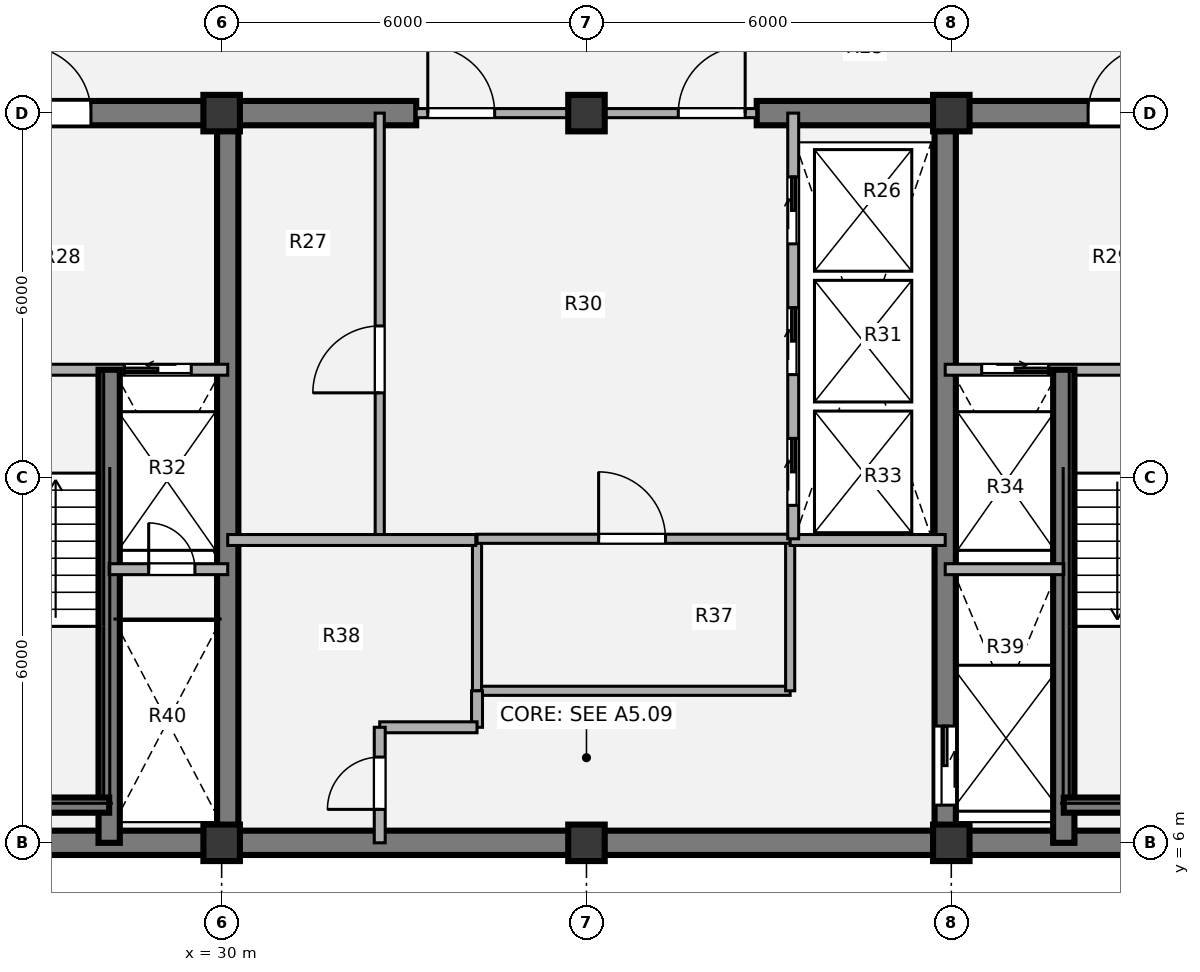
"""IFC4 building model, lengths in metres.
Left out: names, types, materials, properties, quantities, classifications, styles, units other than length and angle.
Written with IfcOpenShell. Run it as: python <this file> out.ifc"""

import sys

from ifc_helpers import new_model, si_unit, direction, frame, frame_2d, origin, origin_2d, place, context, subcontext, project, spatial, rectangle, extrude, source, transform, mapped, element, fill, save


model = new_model("IFC4")
c1 = context("Model", 3, precision=1e-05, world=origin(), true_north=direction((0.0, 1.0)))
c2 = subcontext(c1, "Body", "Model", "MODEL_VIEW")
j1 = project(units=[si_unit("LENGTHUNIT", "METRE"), si_unit("PLANEANGLEUNIT", "RADIAN")], contexts=[c1])
p1 = place(None, origin())
s1 = spatial("IfcSite", under=j1, at=p1, CompositionType="ELEMENT")
p2 = place(p1, origin())
s2 = spatial("IfcBuilding", under=s1, at=p2, CompositionType="ELEMENT")
p3 = place(p2, frame((0.0, 0.0, 226.8)))
s3 = spatial("IfcBuildingStorey", under=s2, at=p3, CompositionType="ELEMENT", Elevation=226.8)
m1 = source(origin(), c2, "Body", "SweptSolid", [
    extrude(rectangle(XDim=0.6, YDim=0.6, at=origin_2d()), origin(), (0.0, 0.0, 1.0), 3.78),
])
for number, where, z_axis, x_axis in (
    (1, (30.0, 6.0, 0.0), (0.0, 0.0, 1.0), (1.0, 0.0, 0.0)),
    (2, (36.0, 6.0, 0.0), (0.0, 0.0, 1.0), (1.0, 0.0, 0.0)),
    (3, (42.0, 6.0, 0.0), (0.0, 0.0, 1.0), (1.0, 0.0, 0.0)),
    (4, (30.0, 18.0, 0.0), (0.0, 0.0, 1.0), (1.0, 0.0, 0.0)),
    (5, (36.0, 18.0, 0.0), (0.0, 0.0, 1.0), (1.0, 0.0, 0.0)),
    (6, (42.0, 18.0, 0.0), (0.0, 0.0, 1.0), (1.0, 0.0, 0.0)),
):
    element("IfcColumn", number, at=place(p3, frame(where, z_axis=z_axis, x_axis=x_axis)), inside=s3, PredefinedType="COLUMN", context=c2, shape_type="MappedRepresentation", body=[
        mapped(m1, transform((0.0, 0.0, 0.0), x_axis=(1.0, 0.0, 0.0), y_axis=(0.0, 1.0, 0.0), z_axis=(0.0, 0.0, 1.0), scale=1.0)),
    ])
p4 = place(p3, frame((48.2, 6.0, 0.0), z_axis=(0.0, 0.0, 1.0), x_axis=(-1.0, 0.0, 0.0)))
e7 = element("IfcWall", 7, at=p4, inside=s3, PredefinedType="SHEAR", context=c2, shape_type="SweptSolid", body=[
    extrude(rectangle(XDim=24.4, YDim=0.4, at=frame_2d((12.2, 0.0))), origin(), (0.0, 0.0, 1.0), 3.78),
])
p5 = place(p3, frame((23.8, 18.0, 0.0), z_axis=(0.0, 0.0, 1.0), x_axis=(1.0, 0.0, 0.0)))
e8 = element("IfcWall", 8, at=p5, inside=s3, PredefinedType="SHEAR", context=c2, shape_type="SweptSolid", body=[
    extrude(rectangle(XDim=9.4, YDim=0.4, at=frame_2d((4.7, 0.0))), origin(), (0.0, 0.0, 1.0), 3.78),
])
p6 = place(p5, frame((2.95, 0.0, 0.0)))
e9 = element("IfcOpeningElement", 9, at=p6, cuts=e8, PredefinedType="OPENING", context=c2, shape_type="SweptSolid", body=[
    extrude(rectangle(XDim=1.1, YDim=2.1, at=origin_2d()), frame((0.55, 0.21, 1.05), z_axis=(0.0, -1.0, 0.0), x_axis=(1.0, 0.0, 0.0)), (0.0, 0.0, 1.0), 0.42),
])
p7 = place(p3, frame((38.8, 18.0, 0.0), z_axis=(0.0, 0.0, 1.0), x_axis=(1.0, 0.0, 0.0)))
e10 = element("IfcWall", 10, at=p7, inside=s3, PredefinedType="SHEAR", context=c2, shape_type="SweptSolid", body=[
    extrude(rectangle(XDim=9.4, YDim=0.4, at=frame_2d((4.7, 0.0))), origin(), (0.0, 0.0, 1.0), 3.78),
])
p8 = place(p7, frame((5.45, 0.0, 0.0)))
e11 = element("IfcOpeningElement", 11, at=p8, cuts=e10, PredefinedType="OPENING", context=c2, shape_type="SweptSolid", body=[
    extrude(rectangle(XDim=1.1, YDim=2.1, at=origin_2d()), frame((0.55, 0.21, 1.05), z_axis=(0.0, -1.0, 0.0), x_axis=(1.0, 0.0, 0.0)), (0.0, 0.0, 1.0), 0.42),
])
p9 = place(p3, frame((30.1, 6.0, 0.0), z_axis=(0.0, 0.0, 1.0), x_axis=(0.0, 1.0, 0.0)))
e12 = element("IfcWall", 12, at=p9, inside=s3, PredefinedType="SHEAR", context=c2, shape_type="SweptSolid", body=[
    extrude(rectangle(XDim=12.0, YDim=0.35, at=frame_2d((6.0, 0.0))), origin(), (0.0, 0.0, 1.0), 3.78),
])
p10 = place(p3, frame((41.9, 18.0, 0.0), z_axis=(0.0, 0.0, 1.0), x_axis=(0.0, -1.0, 0.0)))
e13 = element("IfcWall", 13, at=p10, inside=s3, PredefinedType="SHEAR", context=c2, shape_type="SweptSolid", body=[
    extrude(rectangle(XDim=12.0, YDim=0.35, at=frame_2d((6.0, 0.0))), origin(), (0.0, 0.0, 1.0), 3.78),
])
p11 = place(p10, frame((10.08, 0.0, 0.0)))
e14 = element("IfcOpeningElement", 14, at=p11, cuts=e13, PredefinedType="OPENING", context=c2, shape_type="SweptSolid", body=[
    extrude(rectangle(XDim=1.3, YDim=2.1, at=origin_2d()), frame((0.65, 0.185, 1.05), z_axis=(0.0, -1.0, 0.0), x_axis=(1.0, 0.0, 0.0)), (0.0, 0.0, 1.0), 0.37),
])
p12 = place(p3, frame((32.6, 11.0, 0.0), z_axis=(0.0, 0.0, 1.0), x_axis=(0.0, 1.0, 0.0)))
e15 = element("IfcWall", 15, at=p12, inside=s3, PredefinedType="PARTITIONING", context=c2, shape_type="SweptSolid", body=[
    extrude(rectangle(XDim=7.0, YDim=0.15, at=frame_2d((3.5, 0.0))), origin(), (0.0, 0.0, 1.0), 3.5),
])
p13 = place(p12, frame((2.4, 0.0, 0.0)))
e16 = element("IfcOpeningElement", 16, at=p13, cuts=e15, PredefinedType="OPENING", context=c2, shape_type="SweptSolid", body=[
    extrude(rectangle(XDim=1.1, YDim=2.1, at=origin_2d()), frame((0.55, 0.085, 1.05), z_axis=(0.0, -1.0, 0.0), x_axis=(1.0, 0.0, 0.0)), (0.0, 0.0, 1.0), 0.17),
])
p14 = place(p3, frame((34.2, 8.5, 0.0), z_axis=(0.0, 0.0, 1.0), x_axis=(1.0, 0.0, 0.0)))
e17 = element("IfcWall", 17, at=p14, inside=s3, PredefinedType="PARTITIONING", context=c2, shape_type="SweptSolid", body=[
    extrude(rectangle(XDim=5.15, YDim=0.15, at=frame_2d((2.575, 0.0))), origin(), (0.0, 0.0, 1.0), 3.5),
])
for number, where, z_axis, x_axis in (
    (18, (34.2, 8.5, 0.0), (0.0, 0.0, 1.0), (0.0, 1.0, 0.0)),
    (19, (39.35, 8.5, 0.0), (0.0, 0.0, 1.0), (0.0, 1.0, 0.0)),
):
    element("IfcWall", number, at=place(p3, frame(where, z_axis=z_axis, x_axis=x_axis)), inside=s3, PredefinedType="PARTITIONING", context=c2, shape_type="SweptSolid", body=[
        extrude(rectangle(XDim=2.5, YDim=0.15, at=frame_2d((1.25, 0.0))), origin(), (0.0, 0.0, 1.0), 3.5),
    ])
p15 = place(p3, frame((34.2, 11.0, 0.0), z_axis=(0.0, 0.0, 1.0), x_axis=(1.0, 0.0, 0.0)))
e20 = element("IfcWall", 20, at=p15, inside=s3, PredefinedType="PARTITIONING", context=c2, shape_type="SweptSolid", body=[
    extrude(rectangle(XDim=5.15, YDim=0.15, at=frame_2d((2.575, 0.0))), origin(), (0.0, 0.0, 1.0), 3.5),
])
p16 = place(p15, frame((2.0, 0.0, 0.0)))
e21 = element("IfcOpeningElement", 21, at=p16, cuts=e20, PredefinedType="OPENING", context=c2, shape_type="SweptSolid", body=[
    extrude(rectangle(XDim=1.1, YDim=2.1, at=origin_2d()), frame((0.55, 0.085, 1.05), z_axis=(0.0, -1.0, 0.0), x_axis=(1.0, 0.0, 0.0)), (0.0, 0.0, 1.0), 0.17),
])
p17 = place(p3, frame((30.1, 10.98, 0.0), z_axis=(0.0, 0.0, 1.0), x_axis=(1.0, 0.0, 0.0)))
e22 = element("IfcWall", 22, at=p17, inside=s3, PredefinedType="PARTITIONING", context=c2, shape_type="SweptSolid", body=[
    extrude(rectangle(XDim=4.08, YDim=0.18, at=frame_2d((2.04, 0.0))), origin(), (0.0, 0.0, 1.0), 3.5),
])
p18 = place(p3, frame((34.2, 7.9, 0.0), z_axis=(0.0, 0.0, 1.0), x_axis=(0.0, 1.0, 0.0)))
e23 = element("IfcWall", 23, at=p18, inside=s3, PredefinedType="PARTITIONING", context=c2, shape_type="SweptSolid", body=[
    extrude(rectangle(XDim=0.6, YDim=0.18, at=frame_2d((0.3, 0.0))), origin(), (0.0, 0.0, 1.0), 3.5),
])
p19 = place(p3, frame((32.6, 7.9, 0.0), z_axis=(0.0, 0.0, 1.0), x_axis=(1.0, 0.0, 0.0)))
e24 = element("IfcWall", 24, at=p19, inside=s3, PredefinedType="PARTITIONING", context=c2, shape_type="SweptSolid", body=[
    extrude(rectangle(XDim=1.6, YDim=0.18, at=frame_2d((0.8, 0.0))), origin(), (0.0, 0.0, 1.0), 3.5),
])
p20 = place(p3, frame((32.6, 6.0, 0.0), z_axis=(0.0, 0.0, 1.0), x_axis=(0.0, 1.0, 0.0)))
e25 = element("IfcWall", 25, at=p20, inside=s3, PredefinedType="PARTITIONING", context=c2, shape_type="SweptSolid", body=[
    extrude(rectangle(XDim=1.9, YDim=0.18, at=frame_2d((0.95, 0.0))), origin(), (0.0, 0.0, 1.0), 3.5),
])
p21 = place(p20, frame((0.55, 0.0, 0.0)))
e26 = element("IfcOpeningElement", 26, at=p21, cuts=e25, PredefinedType="OPENING", context=c2, shape_type="SweptSolid", body=[
    extrude(rectangle(XDim=0.86, YDim=2.1, at=origin_2d()), frame((0.43, 0.1, 1.05), z_axis=(0.0, -1.0, 0.0), x_axis=(1.0, 0.0, 0.0)), (0.0, 0.0, 1.0), 0.2),
])
p22 = place(p3, frame((39.35, 10.98, 0.0), z_axis=(0.0, 0.0, 1.0), x_axis=(1.0, 0.0, 0.0)))
e27 = element("IfcWall", 27, at=p22, inside=s3, PredefinedType="PARTITIONING", context=c2, shape_type="SweptSolid", body=[
    extrude(rectangle(XDim=2.55, YDim=0.18, at=frame_2d((1.275, 0.0))), origin(), (0.0, 0.0, 1.0), 3.5),
])
p23 = place(p3, frame((33.2, 18.0, 0.0), z_axis=(0.0, 0.0, 1.0), x_axis=(1.0, 0.0, 0.0)))
e28 = element("IfcWall", 28, at=p23, inside=s3, PredefinedType="PARTITIONING", context=c2, shape_type="SweptSolid", body=[
    extrude(rectangle(XDim=5.6, YDim=0.15, at=frame_2d((2.8, 0.0))), origin(), (0.0, 0.0, 1.0), 2.515),
])
p24 = place(p23, frame((0.19, 0.0, 0.0)))
e29 = element("IfcOpeningElement", 29, at=p24, cuts=e28, PredefinedType="OPENING", context=c2, shape_type="SweptSolid", body=[
    extrude(rectangle(XDim=1.1, YDim=2.1, at=origin_2d()), frame((0.55, 0.085, 1.05), z_axis=(0.0, -1.0, 0.0), x_axis=(1.0, 0.0, 0.0)), (0.0, 0.0, 1.0), 0.17),
])
p25 = place(p23, frame((4.31, 0.0, 0.0)))
e30 = element("IfcOpeningElement", 30, at=p25, cuts=e28, PredefinedType="OPENING", context=c2, shape_type="SweptSolid", body=[
    extrude(rectangle(XDim=1.1, YDim=2.1, at=origin_2d()), frame((0.55, 0.085, 1.05), z_axis=(0.0, -1.0, 0.0), x_axis=(1.0, 0.0, 0.0)), (0.0, 0.0, 1.0), 0.17),
])
p26 = place(p3, frame((24.0, 13.78, 0.0), z_axis=(0.0, 0.0, 1.0), x_axis=(1.0, 0.0, 0.0)))
e31 = element("IfcWall", 31, at=p26, inside=s3, PredefinedType="PARTITIONING", context=c2, shape_type="SweptSolid", body=[
    extrude(rectangle(XDim=6.1, YDim=0.18, at=frame_2d((3.05, 0.0))), origin(), (0.0, 0.0, 1.0), 3.5),
])
p27 = place(p26, frame((1.15, 0.0, 0.0)))
e32 = element("IfcOpeningElement", 32, at=p27, cuts=e31, PredefinedType="OPENING", context=c2, shape_type="SweptSolid", body=[
    extrude(rectangle(XDim=1.1, YDim=2.1, at=origin_2d()), frame((0.55, 0.1, 1.05), z_axis=(0.0, -1.0, 0.0), x_axis=(1.0, 0.0, 0.0)), (0.0, 0.0, 1.0), 0.2),
])
p28 = place(p26, frame((4.4, 0.0, 0.0)))
e33 = element("IfcOpeningElement", 33, at=p28, cuts=e31, PredefinedType="OPENING", context=c2, shape_type="SweptSolid", body=[
    extrude(rectangle(XDim=1.1, YDim=2.1, at=origin_2d()), frame((0.55, 0.1, 1.05), z_axis=(0.0, -1.0, 0.0), x_axis=(1.0, 0.0, 0.0)), (0.0, 0.0, 1.0), 0.2),
])
p29 = place(p3, frame((28.15, 6.0, 0.0), z_axis=(0.0, 0.0, 1.0), x_axis=(0.0, 1.0, 0.0)))
e34 = element("IfcWall", 34, at=p29, inside=s3, PredefinedType="SHEAR", context=c2, shape_type="SweptSolid", body=[
    extrude(rectangle(XDim=7.78, YDim=0.35, at=frame_2d((3.89, 0.0))), origin(), (0.0, 0.0, 1.0), 3.85),
])
p30 = place(p3, frame((24.58, 6.62, 0.0), z_axis=(0.0, 0.0, 1.0), x_axis=(1.0, 0.0, 0.0)))
e35 = element("IfcWall", 35, at=p30, inside=s3, PredefinedType="SHEAR", context=c2, shape_type="SweptSolid", body=[
    extrude(rectangle(XDim=3.57, YDim=0.25, at=frame_2d((1.785, 0.0))), origin(), (0.0, 0.0, 1.0), 3.85),
])
p31 = place(p3, frame((28.15, 10.5, 0.0), z_axis=(0.0, 0.0, 1.0), x_axis=(1.0, 0.0, 0.0)))
e36 = element("IfcWall", 36, at=p31, inside=s3, PredefinedType="PARTITIONING", context=c2, shape_type="SweptSolid", body=[
    extrude(rectangle(XDim=1.95, YDim=0.18, at=frame_2d((0.975, 0.0))), origin(), (0.0, 0.0, 1.0), 3.5),
])
p32 = place(p31, frame((0.65, 0.0, 0.0)))
e37 = element("IfcOpeningElement", 37, at=p32, cuts=e36, PredefinedType="OPENING", context=c2, shape_type="SweptSolid", body=[
    extrude(rectangle(XDim=0.76, YDim=2.05, at=origin_2d()), frame((0.38, 0.1, 1.025), z_axis=(0.0, -1.0, 0.0), x_axis=(1.0, 0.0, 0.0)), (0.0, 0.0, 1.0), 0.2),
])
p33 = place(p3, frame((41.9, 13.78, 0.0), z_axis=(0.0, 0.0, 1.0), x_axis=(1.0, 0.0, 0.0)))
e38 = element("IfcWall", 38, at=p33, inside=s3, PredefinedType="PARTITIONING", context=c2, shape_type="SweptSolid", body=[
    extrude(rectangle(XDim=6.1, YDim=0.18, at=frame_2d((3.05, 0.0))), origin(), (0.0, 0.0, 1.0), 3.5),
])
p34 = place(p33, frame((0.6, 0.0, 0.0)))
e39 = element("IfcOpeningElement", 39, at=p34, cuts=e38, PredefinedType="OPENING", context=c2, shape_type="SweptSolid", body=[
    extrude(rectangle(XDim=1.1, YDim=2.1, at=origin_2d()), frame((0.55, 0.1, 1.05), z_axis=(0.0, -1.0, 0.0), x_axis=(1.0, 0.0, 0.0)), (0.0, 0.0, 1.0), 0.2),
])
p35 = place(p33, frame((3.8, 0.0, 0.0)))
e40 = element("IfcOpeningElement", 40, at=p35, cuts=e38, PredefinedType="OPENING", context=c2, shape_type="SweptSolid", body=[
    extrude(rectangle(XDim=1.1, YDim=2.1, at=origin_2d()), frame((0.55, 0.1, 1.05), z_axis=(0.0, -1.0, 0.0), x_axis=(1.0, 0.0, 0.0)), (0.0, 0.0, 1.0), 0.2),
])
p36 = place(p3, frame((43.85, 6.0, 0.0), z_axis=(0.0, 0.0, 1.0), x_axis=(0.0, 1.0, 0.0)))
e41 = element("IfcWall", 41, at=p36, inside=s3, PredefinedType="SHEAR", context=c2, shape_type="SweptSolid", body=[
    extrude(rectangle(XDim=7.78, YDim=0.35, at=frame_2d((3.89, 0.0))), origin(), (0.0, 0.0, 1.0), 3.85),
])
p37 = place(p3, frame((43.85, 6.62, 0.0), z_axis=(0.0, 0.0, 1.0), x_axis=(1.0, 0.0, 0.0)))
e42 = element("IfcWall", 42, at=p37, inside=s3, PredefinedType="SHEAR", context=c2, shape_type="SweptSolid", body=[
    extrude(rectangle(XDim=3.57, YDim=0.25, at=frame_2d((1.785, 0.0))), origin(), (0.0, 0.0, 1.0), 3.85),
])
p38 = place(p3, frame((41.9, 10.5, 0.0), z_axis=(0.0, 0.0, 1.0), x_axis=(1.0, 0.0, 0.0)))
e43 = element("IfcWall", 43, at=p38, inside=s3, PredefinedType="PARTITIONING", context=c2, shape_type="SweptSolid", body=[
    extrude(rectangle(XDim=1.95, YDim=0.18, at=frame_2d((0.975, 0.0))), origin(), (0.0, 0.0, 1.0), 3.5),
])
p39 = place(p3, frame((39.4, 11.0, 0.0), z_axis=(0.0, 0.0, 1.0), x_axis=(0.0, 1.0, 0.0)))
e44 = element("IfcWall", 44, at=p39, inside=s3, PredefinedType="PARTITIONING", context=c2, shape_type="SweptSolid", body=[
    extrude(rectangle(XDim=7.0, YDim=0.18, at=frame_2d((3.5, 0.0))), origin(), (0.0, 0.0, 1.0), 3.5),
])
p40 = place(p39, frame((0.55, 0.0, 0.0)))
e45 = element("IfcOpeningElement", 45, at=p40, cuts=e44, PredefinedType="OPENING", context=c2, shape_type="SweptSolid", body=[
    extrude(rectangle(XDim=1.1, YDim=2.1, at=origin_2d()), frame((0.55, 0.1, 1.05), z_axis=(0.0, -1.0, 0.0), x_axis=(1.0, 0.0, 0.0)), (0.0, 0.0, 1.0), 0.2),
])
p41 = place(p39, frame((2.7, 0.0, 0.0)))
e46 = element("IfcOpeningElement", 46, at=p41, cuts=e44, PredefinedType="OPENING", context=c2, shape_type="SweptSolid", body=[
    extrude(rectangle(XDim=1.1, YDim=2.1, at=origin_2d()), frame((0.55, 0.1, 1.05), z_axis=(0.0, -1.0, 0.0), x_axis=(1.0, 0.0, 0.0)), (0.0, 0.0, 1.0), 0.2),
])
p42 = place(p39, frame((4.85, 0.0, 0.0)))
e47 = element("IfcOpeningElement", 47, at=p42, cuts=e44, PredefinedType="OPENING", context=c2, shape_type="SweptSolid", body=[
    extrude(rectangle(XDim=1.1, YDim=2.1, at=origin_2d()), frame((0.55, 0.1, 1.05), z_axis=(0.0, -1.0, 0.0), x_axis=(1.0, 0.0, 0.0)), (0.0, 0.0, 1.0), 0.2),
])
m2 = source(origin(), c2, "Body", "SweptSolid", [
    extrude(rectangle(XDim=1.1, YDim=2.1, at=origin_2d()), frame((0.55, 0.025, 1.05), z_axis=(0.0, -1.0, 0.0), x_axis=(1.0, 0.0, 0.0)), (0.0, 0.0, 1.0), 0.05),
])
p43 = place(p13, origin())
e48 = element("IfcDoor", 48, at=p43, inside=s3, OperationType="SINGLE_SWING_LEFT", PredefinedType="DOOR", context=c2, shape_type="MappedRepresentation", body=[
    mapped(m2, transform((0.0, 0.0, 0.0), x_axis=(1.0, 0.0, 0.0), y_axis=(0.0, 1.0, 0.0), z_axis=(0.0, 0.0, 1.0), scale=1.0)),
])
fill(e16, e48)
p44 = place(p16, origin())
e49 = element("IfcDoor", 49, at=p44, inside=s3, OperationType="SINGLE_SWING_LEFT", PredefinedType="DOOR", context=c2, shape_type="MappedRepresentation", body=[
    mapped(m2, transform((0.0, 0.0, 0.0), x_axis=(1.0, 0.0, 0.0), y_axis=(0.0, 1.0, 0.0), z_axis=(0.0, 0.0, 1.0), scale=1.0)),
])
fill(e21, e49)
m3 = source(origin(), c2, "Body", "SweptSolid", [
    extrude(rectangle(XDim=0.86, YDim=2.1, at=origin_2d()), frame((0.43, 0.025, 1.05), z_axis=(0.0, -1.0, 0.0), x_axis=(1.0, 0.0, 0.0)), (0.0, 0.0, 1.0), 0.05),
])
p45 = place(p21, origin())
e50 = element("IfcDoor", 50, at=p45, inside=s3, OperationType="SINGLE_SWING_LEFT", PredefinedType="DOOR", context=c2, shape_type="MappedRepresentation", body=[
    mapped(m3, transform((0.0, 0.0, 0.0), x_axis=(1.0, 0.0, 0.0), y_axis=(0.0, 1.0, 0.0), z_axis=(0.0, 0.0, 1.0), scale=1.0)),
])
fill(e26, e50)
m4 = source(origin(), c2, "Body", "SweptSolid", [
    extrude(rectangle(XDim=1.1, YDim=2.1, at=origin_2d()), frame((0.55, 0.025, 1.05), z_axis=(0.0, -1.0, 0.0), x_axis=(1.0, 0.0, 0.0)), (0.0, 0.0, 1.0), 0.05),
])
p46 = place(p24, origin())
e51 = element("IfcDoor", 51, at=p46, inside=s3, OperationType="SINGLE_SWING_LEFT", PredefinedType="DOOR", context=c2, shape_type="MappedRepresentation", body=[
    mapped(m4, transform((0.0, 0.0, 0.0), x_axis=(1.0, 0.0, 0.0), y_axis=(0.0, 1.0, 0.0), z_axis=(0.0, 0.0, 1.0), scale=1.0)),
])
fill(e29, e51)
p47 = place(p25, origin())
e52 = element("IfcDoor", 52, at=p47, inside=s3, OperationType="SINGLE_SWING_RIGHT", PredefinedType="DOOR", context=c2, shape_type="MappedRepresentation", body=[
    mapped(m4, transform((0.0, 0.0, 0.0), x_axis=(1.0, 0.0, 0.0), y_axis=(0.0, 1.0, 0.0), z_axis=(0.0, 0.0, 1.0), scale=1.0)),
])
fill(e30, e52)
m5 = source(origin(), c2, "Body", "SweptSolid", [
    extrude(rectangle(XDim=1.1, YDim=2.1, at=origin_2d()), frame((0.55, 0.025, 1.05), z_axis=(0.0, -1.0, 0.0), x_axis=(1.0, 0.0, 0.0)), (0.0, 0.0, 1.0), 0.05),
])
p48 = place(p28, origin())
e53 = element("IfcDoor", 53, at=p48, inside=s3, OperationType="SLIDING_TO_LEFT", PredefinedType="DOOR", context=c2, shape_type="MappedRepresentation", body=[
    mapped(m5, transform((0.0, 0.0, 0.0), x_axis=(1.0, 0.0, 0.0), y_axis=(0.0, 1.0, 0.0), z_axis=(0.0, 0.0, 1.0), scale=1.0)),
])
fill(e33, e53)
m6 = source(origin(), c2, "Body", "SweptSolid", [
    extrude(rectangle(XDim=0.76, YDim=2.05, at=origin_2d()), frame((0.38, 0.025, 1.025), z_axis=(0.0, -1.0, 0.0), x_axis=(1.0, 0.0, 0.0)), (0.0, 0.0, 1.0), 0.05),
])
p49 = place(p32, origin())
e54 = element("IfcDoor", 54, at=p49, inside=s3, OperationType="SINGLE_SWING_LEFT", PredefinedType="DOOR", context=c2, shape_type="MappedRepresentation", body=[
    mapped(m6, transform((0.0, 0.0, 0.0), x_axis=(1.0, 0.0, 0.0), y_axis=(0.0, 1.0, 0.0), z_axis=(0.0, 0.0, 1.0), scale=1.0)),
])
fill(e37, e54)
p50 = place(p34, origin())
e55 = element("IfcDoor", 55, at=p50, inside=s3, OperationType="SLIDING_TO_RIGHT", PredefinedType="DOOR", context=c2, shape_type="MappedRepresentation", body=[
    mapped(m5, transform((0.0, 0.0, 0.0), x_axis=(1.0, 0.0, 0.0), y_axis=(0.0, 1.0, 0.0), z_axis=(0.0, 0.0, 1.0), scale=1.0)),
])
fill(e39, e55)
m7 = source(origin(), c2, "Body", "SweptSolid", [
    extrude(rectangle(XDim=1.3, YDim=2.1, at=origin_2d()), frame((0.65, 0.025, 1.05), z_axis=(0.0, -1.0, 0.0), x_axis=(1.0, 0.0, 0.0)), (0.0, 0.0, 1.0), 0.05),
])
p51 = place(p11, origin())
e56 = element("IfcDoor", 56, at=p51, inside=s3, OperationType="SLIDING_TO_LEFT", PredefinedType="DOOR", context=c2, shape_type="MappedRepresentation", body=[
    mapped(m7, transform((0.0, 0.0, 0.0), x_axis=(1.0, 0.0, 0.0), y_axis=(0.0, 1.0, 0.0), z_axis=(0.0, 0.0, 1.0), scale=1.0)),
])
fill(e14, e56)
p52 = place(p6, origin())
e57 = element("IfcDoor", 57, at=p52, inside=s3, OperationType="SINGLE_SWING_LEFT", PredefinedType="DOOR", context=c2, shape_type="MappedRepresentation", body=[
    mapped(m4, transform((0.0, 0.0, 0.0), x_axis=(1.0, 0.0, 0.0), y_axis=(0.0, 1.0, 0.0), z_axis=(0.0, 0.0, 1.0), scale=1.0)),
])
fill(e9, e57)
p53 = place(p8, origin())
e58 = element("IfcDoor", 58, at=p53, inside=s3, OperationType="SINGLE_SWING_RIGHT", PredefinedType="DOOR", context=c2, shape_type="MappedRepresentation", body=[
    mapped(m4, transform((0.0, 0.0, 0.0), x_axis=(1.0, 0.0, 0.0), y_axis=(0.0, 1.0, 0.0), z_axis=(0.0, 0.0, 1.0), scale=1.0)),
])
fill(e11, e58)
p54 = place(p40, origin())
e59 = element("IfcDoor", 59, at=p54, inside=s3, OperationType="SLIDING_TO_RIGHT", PredefinedType="DOOR", context=c2, shape_type="MappedRepresentation", body=[
    mapped(m5, transform((0.0, 0.0, 0.0), x_axis=(1.0, 0.0, 0.0), y_axis=(0.0, 1.0, 0.0), z_axis=(0.0, 0.0, 1.0), scale=1.0)),
])
fill(e45, e59)
p55 = place(p41, origin())
e60 = element("IfcDoor", 60, at=p55, inside=s3, OperationType="SLIDING_TO_RIGHT", PredefinedType="DOOR", context=c2, shape_type="MappedRepresentation", body=[
    mapped(m5, transform((0.0, 0.0, 0.0), x_axis=(1.0, 0.0, 0.0), y_axis=(0.0, 1.0, 0.0), z_axis=(0.0, 0.0, 1.0), scale=1.0)),
])
fill(e46, e60)
p56 = place(p42, origin())
e61 = element("IfcDoor", 61, at=p56, inside=s3, OperationType="SLIDING_TO_RIGHT", PredefinedType="DOOR", context=c2, shape_type="MappedRepresentation", body=[
    mapped(m5, transform((0.0, 0.0, 0.0), x_axis=(1.0, 0.0, 0.0), y_axis=(0.0, 1.0, 0.0), z_axis=(0.0, 0.0, 1.0), scale=1.0)),
])
fill(e47, e61)
save(model, sys.argv[1])
